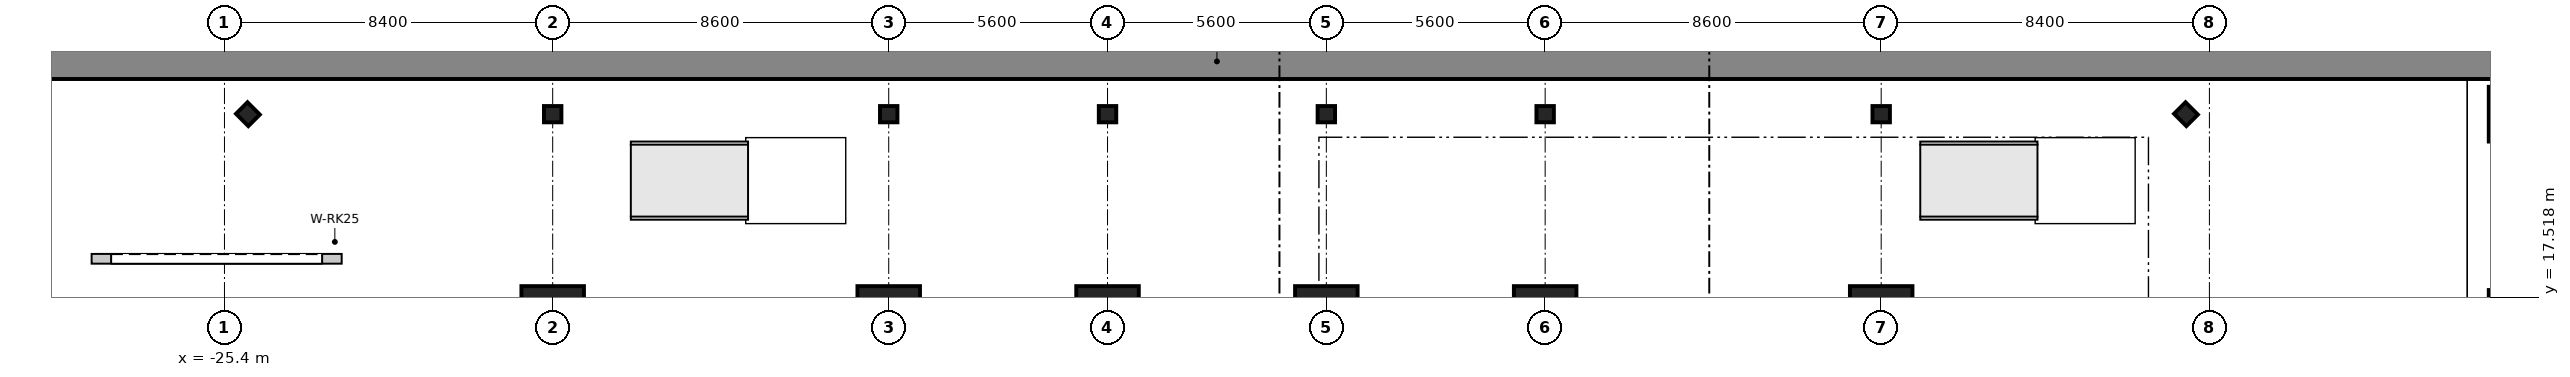
"""IFC4 building model, lengths in metres.
Left out: names, types, materials, properties, quantities, classifications, styles, units other than length and angle.
Written with IfcOpenShell. Run it as: python <this file> out.ifc"""

import sys

from ifc_helpers import new_model, si_unit, direction, frame, frame_2d, origin, origin_2d, place, context, subcontext, project, spatial, rectangle, i_section, extrude, source, transform, mapped, element, fill, save


model = new_model("IFC4")
c1 = context("Model", 3, precision=1e-05, world=origin(), true_north=direction((0.0, 1.0)))
c2 = subcontext(c1, "Body", "Model", "MODEL_VIEW")
j1 = project(units=[si_unit("LENGTHUNIT", "METRE"), si_unit("PLANEANGLEUNIT", "RADIAN")], contexts=[c1])
p1 = place(None, origin())
s1 = spatial("IfcSite", under=j1, at=p1, CompositionType="ELEMENT")
p2 = place(p1, origin())
s2 = spatial("IfcBuilding", under=s1, at=p2, CompositionType="ELEMENT")
p3 = place(p2, frame((0.0, 0.0, -10.8)))
s3 = spatial("IfcBuildingStorey", under=s2, at=p3, CompositionType="ELEMENT", Elevation=-10.8)
m1 = source(origin(), c2, "Body", "SweptSolid", [
    extrude(rectangle(XDim=76.0, YDim=0.9, at=frame_2d((38.0, 0.0))), origin(), (0.0, 0.0, 1.0), 4.98),
])
p4 = place(p3, frame((-38.0, 23.55, 0.0), z_axis=(0.0, 0.0, 1.0), x_axis=(1.0, 0.0, 0.0)))
e1 = element("IfcWall", 1, at=p4, inside=s3, PredefinedType="SHEAR", context=c2, shape_type="MappedRepresentation", body=[
    mapped(m1, transform((0.0, 0.0, 0.0), scale=1.0)),
])
m2 = source(origin(), c2, "Body", "SweptSolid", [
    extrude(rectangle(XDim=1.6, YDim=1.6, at=origin_2d()), origin(), (0.0, 0.0, 1.0), 5.355),
])
for number, where, z_axis, x_axis in (
    (2, (-17.0, 17.0, 0.0), (0.0, 0.0, 1.0), (1.0, 0.0, 0.0)),
    (3, (-8.4, 17.0, 0.0), (0.0, 0.0, 1.0), (1.0, 0.0, 0.0)),
    (4, (-2.8, 17.0, 0.0), (0.0, 0.0, 1.0), (1.0, 0.0, 0.0)),
    (5, (2.8, 17.0, 0.0), (0.0, 0.0, 1.0), (1.0, 0.0, 0.0)),
    (6, (8.4, 17.0, 0.0), (0.0, 0.0, 1.0), (1.0, 0.0, 0.0)),
    (7, (17.0, 17.0, 0.0), (0.0, 0.0, 1.0), (1.0, 0.0, 0.0)),
):
    element("IfcColumn", number, at=place(p3, frame(where, z_axis=z_axis, x_axis=x_axis)), inside=s3, PredefinedType="COLUMN", context=c2, shape_type="MappedRepresentation", body=[
        mapped(m2, transform((0.0, 0.0, 0.0), scale=1.0)),
    ])
m3 = source(origin(), c2, "Body", "SweptSolid", [
    extrude(rectangle(XDim=0.9, YDim=1.4, at=origin_2d()), origin(), (0.0, 0.0, 1.0), 5.355),
])
for number, where, z_axis, x_axis in (
    (8, (33.0, 17.0, 0.0), (0.0, 0.0, 1.0), (1.0, 0.0, 0.0)),
    (9, (33.0, 22.2, 0.0), (0.0, 0.0, 1.0), (1.0, 0.0, 0.0)),
):
    element("IfcColumn", number, at=place(p3, frame(where, z_axis=z_axis, x_axis=x_axis)), inside=s3, PredefinedType="PILASTER", context=c2, shape_type="MappedRepresentation", body=[
        mapped(m3, transform((0.0, 0.0, 0.0), scale=1.0)),
    ])
m4 = source(origin(), c2, "Body", "SweptSolid", [
    extrude(i_section(OverallWidth=0.416, OverallDepth=0.446, WebThickness=0.025, FlangeThickness=0.04, at=origin_2d()), origin(), (0.0, 0.0, 1.0), 5.355),
])
for number, where, z_axis, x_axis in (
    (10, (-17.0, 22.2, 0.0), (0.0, 0.0, 1.0), (0.0, 1.0, 0.0)),
    (11, (-8.4, 22.2, 0.0), (0.0, 0.0, 1.0), (0.0, 1.0, 0.0)),
    (12, (-2.8, 22.2, 0.0), (0.0, 0.0, 1.0), (0.0, 1.0, 0.0)),
    (13, (2.8, 22.2, 0.0), (0.0, 0.0, 1.0), (0.0, 1.0, 0.0)),
    (14, (8.4, 22.2, 0.0), (0.0, 0.0, 1.0), (0.0, 1.0, 0.0)),
    (15, (17.0, 22.2, 0.0), (0.0, 0.0, 1.0), (0.0, 1.0, 0.0)),
    (16, (-24.8, 22.2, 0.0), (0.0, 0.0, 1.0), (0.707, 0.707, 0.0)),
    (17, (24.8, 22.2, 0.0), (0.0, 0.0, 1.0), (0.707, 0.707, 0.0)),
):
    element("IfcColumn", number, at=place(p3, frame(where, z_axis=z_axis, x_axis=x_axis)), inside=s3, PredefinedType="COLUMN", context=c2, shape_type="MappedRepresentation", body=[
        mapped(m4, transform((0.0, 0.0, 0.0), scale=1.0)),
    ])
m5 = source(origin(), c2, "Body", "SweptSolid", [
    extrude(rectangle(XDim=6.4, YDim=0.25, at=frame_2d((3.2, 0.0))), origin(), (0.0, 0.0, 1.0), 4.95),
])
p5 = place(p3, frame((-28.8, 18.5, 0.0), z_axis=(0.0, 0.0, 1.0), x_axis=(1.0, 0.0, 0.0)))
e18 = element("IfcWall", 18, at=p5, inside=s3, PredefinedType="PARTITIONING", context=c2, shape_type="MappedRepresentation", body=[
    mapped(m5, transform((0.0, 0.0, 0.0), scale=1.0)),
])
p6 = place(p5, frame((0.5, 0.0, 0.0)))
e19 = element("IfcOpeningElement", 19, at=p6, cuts=e18, PredefinedType="OPENING", context=c2, shape_type="SweptSolid", body=[
    extrude(rectangle(XDim=5.4, YDim=3.1, at=frame_2d((2.7, 1.55))), frame((0.0, 0.135, 0.0), z_axis=(0.0, -1.0, 0.0), x_axis=(1.0, 0.0, 0.0)), (0.0, 0.0, 1.0), 0.27),
])
m6 = source(origin(), c2, "Body", "SweptSolid", [
    extrude(rectangle(XDim=5.4, YDim=3.1, at=frame_2d((2.7, 1.55))), frame((0.0, 0.025, 0.0), z_axis=(0.0, -1.0, 0.0), x_axis=(1.0, 0.0, 0.0)), (0.0, 0.0, 1.0), 0.05),
])
p7 = place(p6, origin())
e20 = element("IfcDoor", 20, at=p7, inside=s3, OperationType="ROLLINGUP", PredefinedType="GATE", context=c2, shape_type="MappedRepresentation", body=[
    mapped(m6, transform((0.0, 0.0, 0.0), scale=1.0)),
])
fill(e19, e20)
save(model, sys.argv[1])
